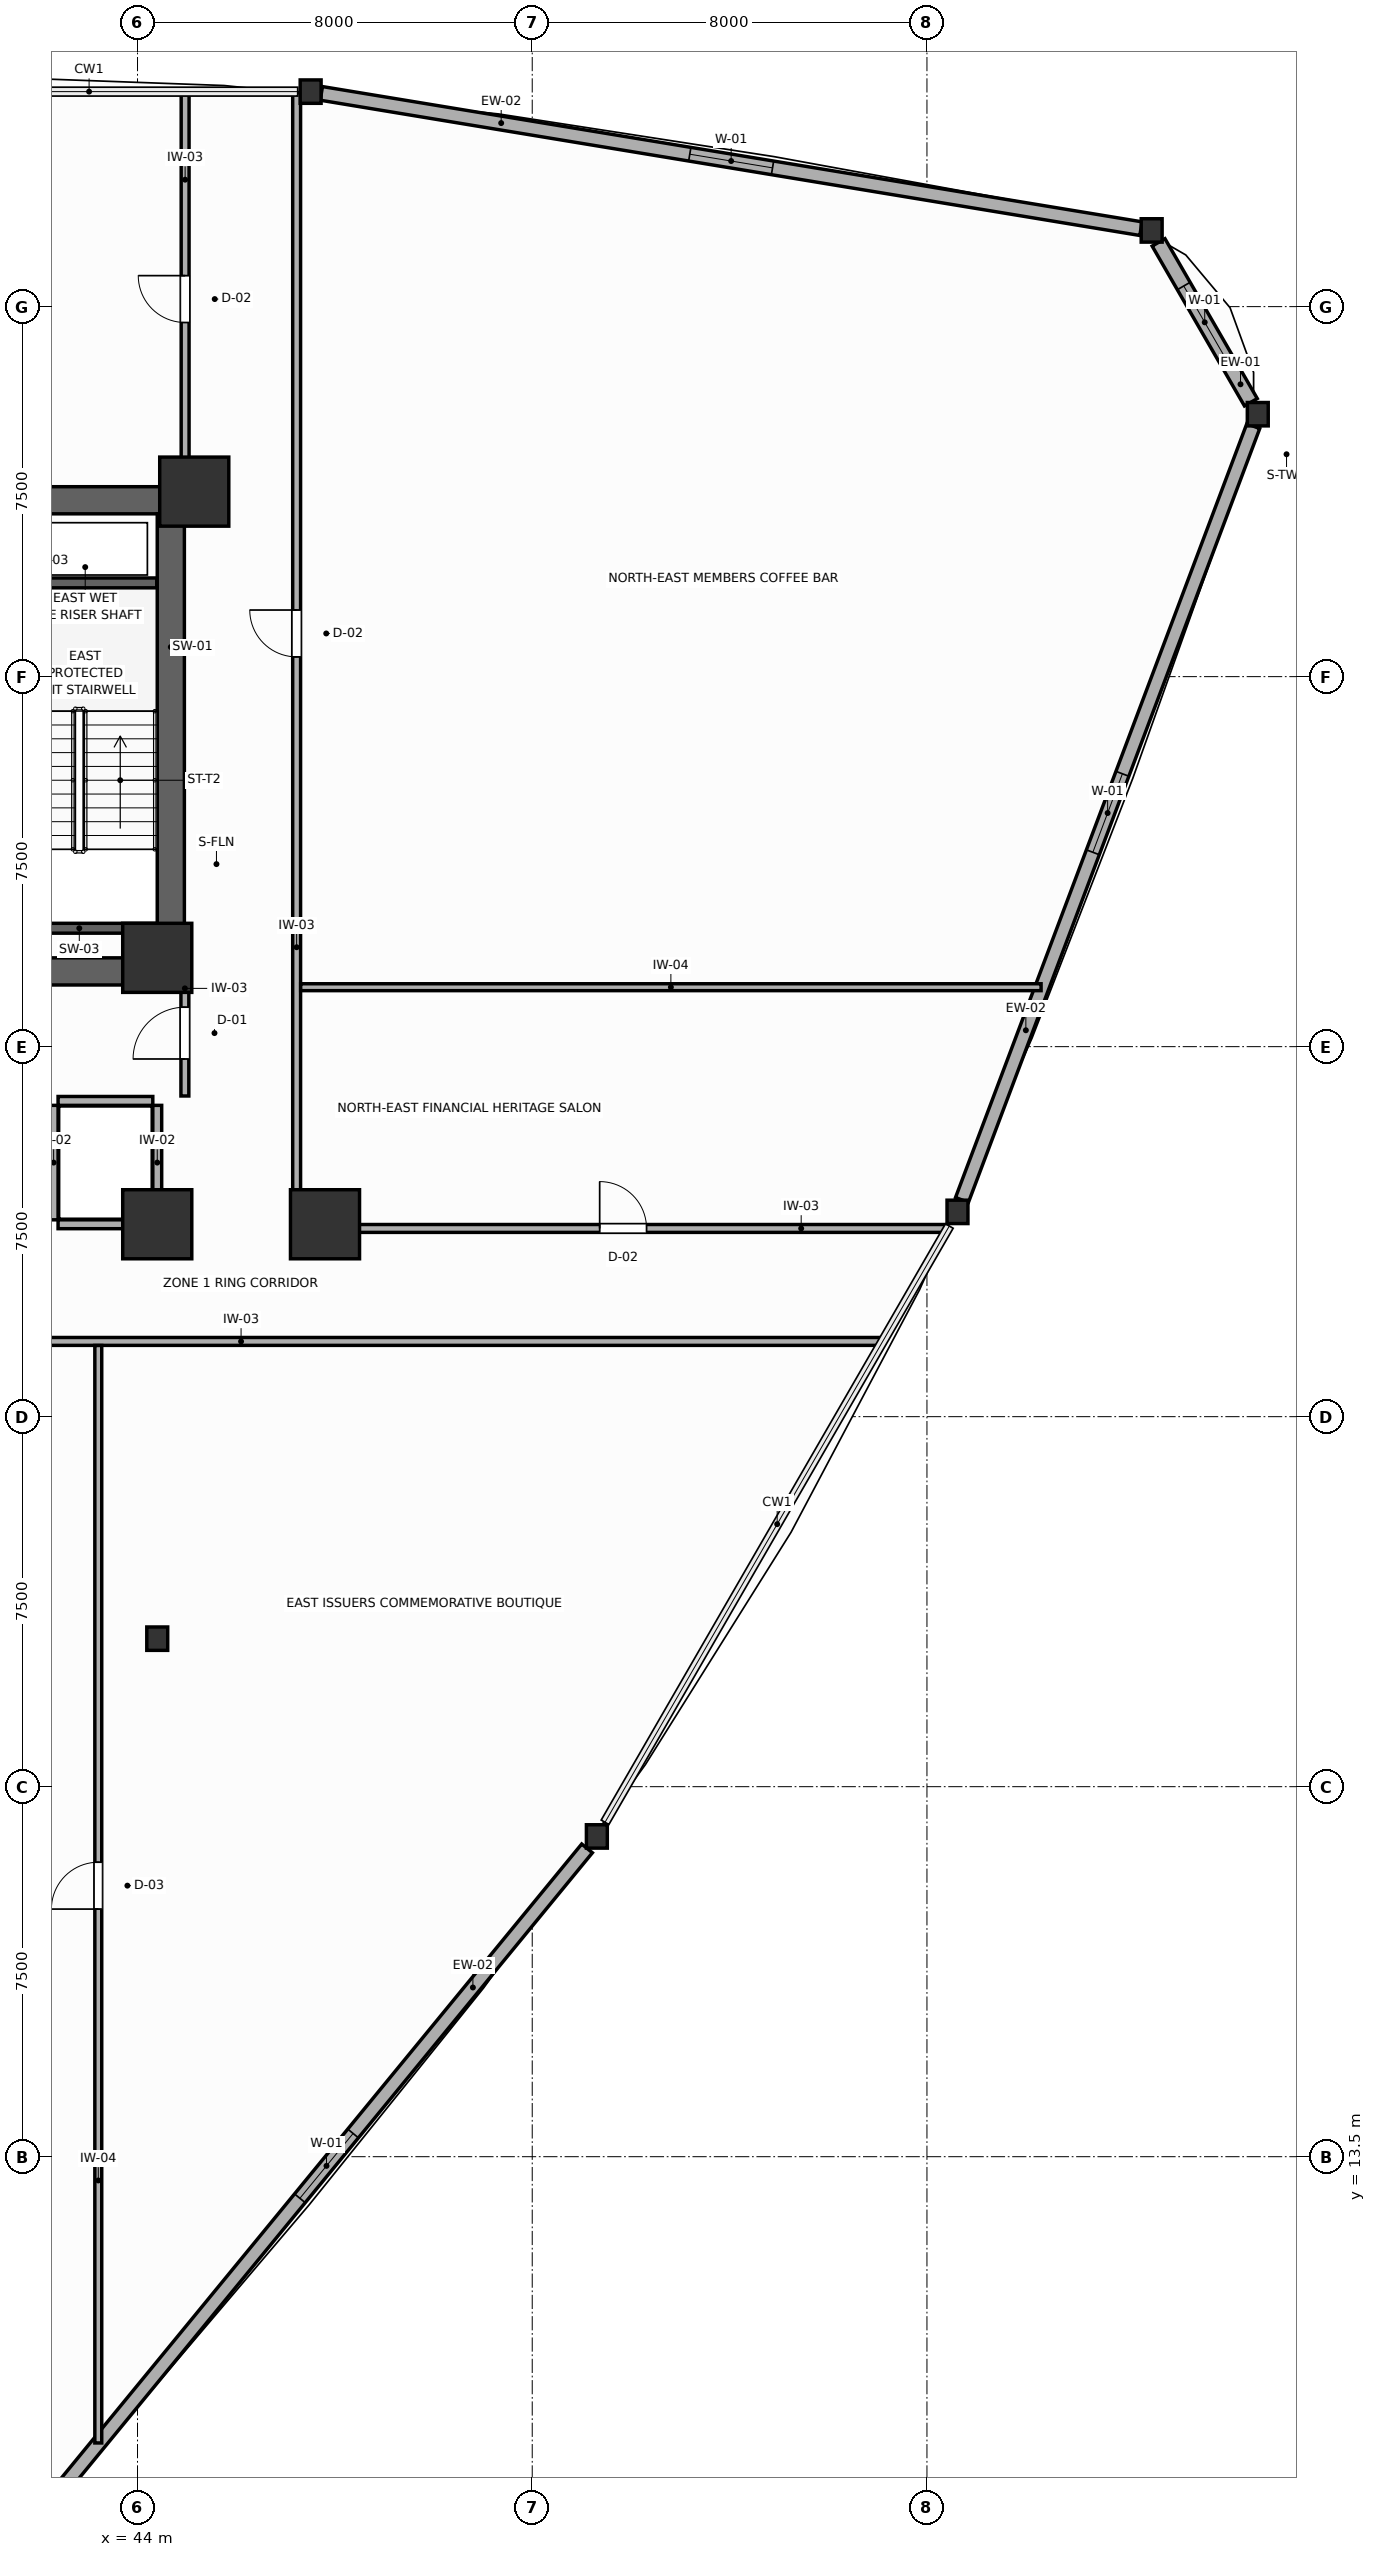
"""IFC4 building model, lengths in metres.
Left out: names, types, materials, properties, quantities, classifications, styles, units other than length and angle.
Written with IfcOpenShell. Run it as: python <this file> out.ifc"""

import sys

from ifc_helpers import new_model, si_unit, direction, frame, frame_2d, origin, origin_2d, place, context, subcontext, project, spatial, rectangle, i_section, extrude, source, transform, mapped, element, fill, save


model = new_model("IFC4")
c1 = context("Model", 3, precision=1e-05, world=origin(), true_north=direction((0.0, 1.0)))
c2 = subcontext(c1, "Body", "Model", "MODEL_VIEW")
j1 = project(units=[si_unit("LENGTHUNIT", "METRE"), si_unit("PLANEANGLEUNIT", "RADIAN")], contexts=[c1])
p1 = place(None, origin())
s1 = spatial("IfcSite", under=j1, at=p1, CompositionType="ELEMENT")
p2 = place(p1, origin())
s2 = spatial("IfcBuilding", under=s1, at=p2, CompositionType="ELEMENT")
p3 = place(p2, frame((0.0, 0.0, 91.2)))
s3 = spatial("IfcBuildingStorey", under=s2, at=p3, CompositionType="ELEMENT", Elevation=91.2)
p4 = place(p3, frame((27.05, 47.075, 0.0), z_axis=(0.0, 0.0, 1.0), x_axis=(1.0, 0.0, 0.0)))
e1 = element("IfcWall", 1, at=p4, inside=s3, PredefinedType="SHEAR", context=c2, shape_type="SweptSolid", body=[
    extrude(rectangle(XDim=17.9, YDim=0.55, at=frame_2d((8.95, 0.0))), origin(), (0.0, 0.0, 1.0), 3.9),
])
p5 = place(p3, frame((27.05, 37.525, 0.0), z_axis=(0.0, 0.0, 1.0), x_axis=(1.0, 0.0, 0.0)))
e2 = element("IfcWall", 2, at=p5, inside=s3, PredefinedType="SHEAR", context=c2, shape_type="SweptSolid", body=[
    extrude(rectangle(XDim=17.9, YDim=0.55, at=frame_2d((8.95, 0.0))), origin(), (0.0, 0.0, 1.0), 3.9),
])
p6 = place(p5, frame((4.975, 0.0, 0.0)))
e3 = element("IfcOpeningElement", 3, at=p6, cuts=e2, PredefinedType="OPENING", context=c2, shape_type="SweptSolid", body=[
    extrude(rectangle(XDim=1.05, YDim=2.1, at=frame_2d((0.525, 1.05))), frame((0.0, 0.285, 0.0), z_axis=(0.0, -1.0, 0.0), x_axis=(1.0, 0.0, 0.0)), (0.0, 0.0, 1.0), 0.57),
])
p7 = place(p5, frame((11.875, 0.0, 0.0)))
e4 = element("IfcOpeningElement", 4, at=p7, cuts=e2, PredefinedType="OPENING", context=c2, shape_type="SweptSolid", body=[
    extrude(rectangle(XDim=1.05, YDim=2.1, at=frame_2d((0.525, 1.05))), frame((0.0, 0.285, 0.0), z_axis=(0.0, -1.0, 0.0), x_axis=(1.0, 0.0, 0.0)), (0.0, 0.0, 1.0), 0.57),
])
p8 = place(p3, frame((44.675, 37.8, 0.0), z_axis=(0.0, 0.0, 1.0), x_axis=(0.0, 1.0, 0.0)))
e5 = element("IfcWall", 5, at=p8, inside=s3, PredefinedType="SHEAR", context=c2, shape_type="SweptSolid", body=[
    extrude(rectangle(XDim=9.0, YDim=0.55, at=frame_2d((4.5, 0.0))), origin(), (0.0, 0.0, 1.0), 3.9),
])
m1 = source(origin(), c2, "Body", "SweptSolid", [
    extrude(rectangle(XDim=1.4, YDim=1.4, at=origin_2d()), origin(), (0.0, 0.0, 1.0), 3.9),
])
for number, where, z_axis, x_axis in (
    (6, (45.15, 47.25, 0.0), (0.0, 0.0, 1.0), (1.0, 0.0, 0.0)),
    (7, (44.4, 37.8, 0.0), (0.0, 0.0, 1.0), (1.0, 0.0, 0.0)),
    (8, (44.4, 32.4, 0.0), (0.0, 0.0, 1.0), (1.0, 0.0, 0.0)),
    (9, (47.8, 32.4, 0.0), (0.0, 0.0, 1.0), (1.0, 0.0, 0.0)),
):
    element("IfcColumn", number, at=place(p3, frame(where, z_axis=z_axis, x_axis=x_axis)), inside=s3, PredefinedType="COLUMN", context=c2, shape_type="MappedRepresentation", body=[
        mapped(m1, transform((0.0, 0.0, 0.0), scale=1.0)),
    ])
m2 = source(origin(), c2, "Body", "SweptSolid", [
    extrude(i_section(OverallWidth=0.424, OverallDepth=0.474, WebThickness=0.045, FlangeThickness=0.072, FilletRadius=0.015, at=origin_2d()), origin(), (0.0, 0.0, 1.0), 3.9),
])
for number, where, z_axis, x_axis in (
    (10, (44.4, 24.0, 0.0), (0.0, 0.0, 1.0), (1.0, 0.0, 0.0)),
    (11, (66.705, 48.82, 0.0), (0.0, 0.0, 1.0), (1.0, 0.0, 0.0)),
    (12, (64.554, 52.544, 0.0), (0.0, 0.0, 1.0), (1.0, 0.0, 0.0)),
    (13, (47.509, 55.358, 0.0), (0.0, 0.0, 1.0), (1.0, 0.0, 0.0)),
    (14, (53.31, 19.991, 0.0), (0.0, 0.0, 1.0), (1.0, 0.0, 0.0)),
    (15, (60.619, 32.651, 0.0), (0.0, 0.0, 1.0), (1.0, 0.0, 0.0)),
):
    element("IfcColumn", number, at=place(p3, frame(where, z_axis=z_axis, x_axis=x_axis)), inside=s3, PredefinedType="COLUMN", context=c2, shape_type="MappedRepresentation", body=[
        mapped(m2, transform((0.0, 0.0, 0.0), scale=1.0)),
    ])
p9 = place(p3, frame((66.565, 49.062, 0.0), z_axis=(0.0, 0.0, 1.0), x_axis=(-0.500012356405, 0.866018269693, 0.0)))
e16 = element("IfcWall", 16, at=p9, inside=s3, PredefinedType="SOLIDWALL", context=c2, shape_type="SweptSolid", body=[
    extrude(rectangle(XDim=3.742, YDim=0.3, at=frame_2d((1.871, 0.0))), origin(), (0.0, 0.0, 1.0), 3.23),
])
p10 = place(p9, frame((1.021, 0.0, 0.75)))
e17 = element("IfcOpeningElement", 17, at=p10, cuts=e16, PredefinedType="OPENING", context=c2, shape_type="SweptSolid", body=[
    extrude(rectangle(XDim=1.7, YDim=1.75, at=frame_2d((0.85, 0.875))), frame((0.0, 0.16, 0.0), z_axis=(0.0, -1.0, 0.0), x_axis=(1.0, 0.0, 0.0)), (0.0, 0.0, 1.0), 0.32),
])
p11 = place(p3, frame((64.337, 52.58, 0.0), z_axis=(0.0, 0.0, 1.0), x_axis=(-0.986649040197, 0.162860896097, 0.0)))
e18 = element("IfcWall", 18, at=p11, inside=s3, PredefinedType="SOLIDWALL", context=c2, shape_type="SweptSolid", body=[
    extrude(rectangle(XDim=16.836, YDim=0.28, at=frame_2d((8.418, 0.0))), origin(), (0.0, 0.0, 1.0), 3.23),
])
p12 = place(p11, frame((7.568, 0.0, 0.75)))
e19 = element("IfcOpeningElement", 19, at=p12, cuts=e18, PredefinedType="OPENING", context=c2, shape_type="SweptSolid", body=[
    extrude(rectangle(XDim=1.7, YDim=1.75, at=frame_2d((0.85, 0.875))), frame((0.0, 0.15, 0.0), z_axis=(0.0, -1.0, 0.0), x_axis=(1.0, 0.0, 0.0)), (0.0, 0.0, 1.0), 0.3),
])
p13 = place(p3, frame((42.549, 6.878, 0.0), z_axis=(0.0, 0.0, 1.0), x_axis=(0.634372560511, 0.77302746036, 0.0)))
e20 = element("IfcWall", 20, at=p13, inside=s3, PredefinedType="SOLIDWALL", context=c2, shape_type="SweptSolid", body=[
    extrude(rectangle(XDim=16.65, YDim=0.28, at=frame_2d((8.325, 0.0))), origin(), (0.0, 0.0, 1.0), 3.23),
])
p14 = place(p13, frame((7.475, 0.0, 0.75)))
e21 = element("IfcOpeningElement", 21, at=p14, cuts=e20, PredefinedType="OPENING", context=c2, shape_type="SweptSolid", body=[
    extrude(rectangle(XDim=1.7, YDim=1.75, at=frame_2d((0.85, 0.875))), frame((0.0, 0.15, 0.0), z_axis=(0.0, -1.0, 0.0), x_axis=(1.0, 0.0, 0.0)), (0.0, 0.0, 1.0), 0.3),
])
p15 = place(p3, frame((60.71, 32.893, 0.0), z_axis=(0.0, 0.0, 1.0), x_axis=(0.352291780657, 0.935890218605, 0.0)))
e22 = element("IfcWall", 22, at=p15, inside=s3, PredefinedType="SOLIDWALL", context=c2, shape_type="SweptSolid", body=[
    extrude(rectangle(XDim=16.759, YDim=0.28, at=frame_2d((8.379, 0.0))), origin(), (0.0, 0.0, 1.0), 3.23),
])
p16 = place(p15, frame((7.53, 0.0, 0.75)))
e23 = element("IfcOpeningElement", 23, at=p16, cuts=e22, PredefinedType="OPENING", context=c2, shape_type="SweptSolid", body=[
    extrude(rectangle(XDim=1.7, YDim=1.75, at=frame_2d((0.85, 0.875))), frame((0.0, 0.15, 0.0), z_axis=(0.0, -1.0, 0.0), x_axis=(1.0, 0.0, 0.0)), (0.0, 0.0, 1.0), 0.3),
])
for number, where, z_axis, x_axis in (
    (24, (41.25, 45.4, 0.0), (0.0, 0.0, 1.0), (1.0, 0.0, 0.0)),
    (25, (41.25, 38.4, 0.0), (0.0, 0.0, 1.0), (1.0, 0.0, 0.0)),
):
    element("IfcWall", number, at=place(p3, frame(where, z_axis=z_axis, x_axis=x_axis)), inside=s3, PredefinedType="SHEAR", context=c2, shape_type="SweptSolid", body=[
        extrude(rectangle(XDim=3.14, YDim=0.2, at=frame_2d((1.57, 0.0))), origin(), (0.0, 0.0, 1.0), 3.9),
    ])
p17 = place(p3, frame((42.39, 34.9, 0.0), z_axis=(0.0, 0.0, 1.0), x_axis=(1.0, 0.0, 0.0)))
e26 = element("IfcWall", 26, at=p17, inside=s3, PredefinedType="PARTITIONING", context=c2, shape_type="SweptSolid", body=[
    extrude(rectangle(XDim=1.92, YDim=0.18, at=frame_2d((0.96, 0.0))), origin(), (0.0, 0.0, 1.0), 3.68),
])
p18 = place(p3, frame((42.39, 32.4, 0.0), z_axis=(0.0, 0.0, 1.0), x_axis=(1.0, 0.0, 0.0)))
e27 = element("IfcWall", 27, at=p18, inside=s3, PredefinedType="PARTITIONING", context=c2, shape_type="SweptSolid", body=[
    extrude(rectangle(XDim=1.92, YDim=0.18, at=frame_2d((0.96, 0.0))), origin(), (0.0, 0.0, 1.0), 3.18),
])
for number, where, z_axis, x_axis in (
    (28, (42.3, 32.49, 0.0), (0.0, 0.0, 1.0), (0.0, 1.0, 0.0)),
    (29, (44.4, 32.49, 0.0), (0.0, 0.0, 1.0), (0.0, 1.0, 0.0)),
):
    element("IfcWall", number, at=place(p3, frame(where, z_axis=z_axis, x_axis=x_axis)), inside=s3, PredefinedType="PARTITIONING", context=c2, shape_type="SweptSolid", body=[
        extrude(rectangle(XDim=2.32, YDim=0.18, at=frame_2d((1.16, 0.0))), origin(), (0.0, 0.0, 1.0), 3.68),
    ])
p19 = place(p3, frame((44.96, 35.0, 0.0), z_axis=(0.0, 0.0, 1.0), x_axis=(0.0, 1.0, 0.0)))
e30 = element("IfcWall", 30, at=p19, inside=s3, PredefinedType="PARTITIONING", context=c2, shape_type="SweptSolid", body=[
    extrude(rectangle(XDim=2.65, YDim=0.16, at=frame_2d((1.325, 0.0))), origin(), (0.0, 0.0, 1.0), 3.68),
])
p20 = place(p19, frame((0.75, 0.0, 0.0)))
e31 = element("IfcOpeningElement", 31, at=p20, cuts=e30, PredefinedType="OPENING", context=c2, shape_type="SweptSolid", body=[
    extrude(rectangle(XDim=1.05, YDim=2.1, at=frame_2d((0.525, 1.05))), frame((0.0, 0.09, 0.0), z_axis=(0.0, -1.0, 0.0), x_axis=(1.0, 0.0, 0.0)), (0.0, 0.0, 1.0), 0.18),
])
p21 = place(p3, frame((21.317, 30.025, 0.0), z_axis=(0.0, 0.0, 1.0), x_axis=(1.0, 0.0, 0.0)))
e32 = element("IfcWall", 32, at=p21, inside=s3, PredefinedType="PARTITIONING", context=c2, shape_type="SweptSolid", body=[
    extrude(rectangle(XDim=37.766, YDim=0.16, at=frame_2d((18.883, 0.0))), origin(), (0.0, 0.0, 1.0), 3.68),
])
p22 = place(p21, frame((10.668, 0.0, 0.0)))
e33 = element("IfcOpeningElement", 33, at=p22, cuts=e32, PredefinedType="OPENING", context=c2, shape_type="SweptSolid", body=[
    extrude(rectangle(XDim=0.95, YDim=2.05, at=frame_2d((0.475, 1.025))), frame((0.0, 0.09, 0.0), z_axis=(0.0, -1.0, 0.0), x_axis=(1.0, 0.0, 0.0)), (0.0, 0.0, 1.0), 0.18),
])
p23 = place(p21, frame((0.38, 0.0, 0.0)))
e34 = element("IfcOpeningElement", 34, at=p23, cuts=e32, PredefinedType="OPENING", context=c2, shape_type="SweptSolid", body=[
    extrude(rectangle(XDim=0.95, YDim=2.05, at=frame_2d((0.475, 1.025))), frame((0.0, 0.09, 0.0), z_axis=(0.0, -1.0, 0.0), x_axis=(1.0, 0.0, 0.0)), (0.0, 0.0, 1.0), 0.18),
])
p24 = place(p3, frame((47.225, 32.31, 0.0), z_axis=(0.0, 0.0, 1.0), x_axis=(0.0, 1.0, 0.0)))
e35 = element("IfcWall", 35, at=p24, inside=s3, PredefinedType="PARTITIONING", context=c2, shape_type="SweptSolid", body=[
    extrude(rectangle(XDim=23.028, YDim=0.16, at=frame_2d((11.514, 0.0))), origin(), (0.0, 0.0, 1.0), 3.18),
])
p25 = place(p24, frame((11.59, 0.0, 0.0)))
e36 = element("IfcOpeningElement", 36, at=p25, cuts=e35, PredefinedType="OPENING", context=c2, shape_type="SweptSolid", body=[
    extrude(rectangle(XDim=0.95, YDim=2.05, at=frame_2d((0.475, 1.025))), frame((0.0, 0.09, 0.0), z_axis=(0.0, -1.0, 0.0), x_axis=(1.0, 0.0, 0.0)), (0.0, 0.0, 1.0), 0.18),
])
p26 = place(p3, frame((47.307, 32.315, 0.0), z_axis=(0.0, 0.0, 1.0), x_axis=(1.0, 0.0, 0.0)))
e37 = element("IfcWall", 37, at=p26, inside=s3, PredefinedType="PARTITIONING", context=c2, shape_type="SweptSolid", body=[
    extrude(rectangle(XDim=13.098, YDim=0.16, at=frame_2d((6.549, 0.0))), origin(), (0.0, 0.0, 1.0), 3.18),
])
p27 = place(p26, frame((6.06, 0.0, 0.0)))
e38 = element("IfcOpeningElement", 38, at=p27, cuts=e37, PredefinedType="OPENING", context=c2, shape_type="SweptSolid", body=[
    extrude(rectangle(XDim=0.95, YDim=2.05, at=frame_2d((0.475, 1.025))), frame((0.0, 0.09, 0.0), z_axis=(0.0, -1.0, 0.0), x_axis=(1.0, 0.0, 0.0)), (0.0, 0.0, 1.0), 0.18),
])
p28 = place(p3, frame((44.965, 47.18, 0.0), z_axis=(0.0, 0.0, 1.0), x_axis=(0.0, 1.0, 0.0)))
e39 = element("IfcWall", 39, at=p28, inside=s3, PredefinedType="PARTITIONING", context=c2, shape_type="SweptSolid", body=[
    extrude(rectangle(XDim=8.158, YDim=0.16, at=frame_2d((4.079, 0.0))), origin(), (0.0, 0.0, 1.0), 3.68),
])
p29 = place(p28, frame((3.498, 0.0, 0.0)))
e40 = element("IfcOpeningElement", 40, at=p29, cuts=e39, PredefinedType="OPENING", context=c2, shape_type="SweptSolid", body=[
    extrude(rectangle(XDim=0.95, YDim=2.05, at=frame_2d((0.475, 1.025))), frame((0.0, 0.09, 0.0), z_axis=(0.0, -1.0, 0.0), x_axis=(1.0, 0.0, 0.0)), (0.0, 0.0, 1.0), 0.18),
])
p30 = place(p3, frame((43.205, 7.698, 0.0), z_axis=(0.0, 0.0, 1.0), x_axis=(0.0, 1.0, 0.0)))
e41 = element("IfcWall", 41, at=p30, inside=s3, PredefinedType="PARTITIONING", context=c2, shape_type="SweptSolid", body=[
    extrude(rectangle(XDim=22.246, YDim=0.14, at=frame_2d((11.123, 0.0))), origin(), (0.0, 0.0, 1.0), 3.18),
])
p31 = place(p30, frame((10.821, 0.0, 0.0)))
e42 = element("IfcOpeningElement", 42, at=p31, cuts=e41, PredefinedType="OPENING", context=c2, shape_type="SweptSolid", body=[
    extrude(rectangle(XDim=0.95, YDim=2.05, at=frame_2d((0.475, 1.025))), frame((0.0, 0.08, 0.0), z_axis=(0.0, -1.0, 0.0), x_axis=(1.0, 0.0, 0.0)), (0.0, 0.0, 1.0), 0.16),
])
p32 = place(p3, frame((47.307, 37.205, 0.0), z_axis=(0.0, 0.0, 1.0), x_axis=(1.0, 0.0, 0.0)))
e43 = element("IfcWall", 43, at=p32, inside=s3, PredefinedType="PARTITIONING", context=c2, shape_type="SweptSolid", body=[
    extrude(rectangle(XDim=15.006, YDim=0.14, at=frame_2d((7.503, 0.0))), origin(), (0.0, 0.0, 1.0), 3.68),
])
p33 = place(p10, origin())
e44 = element("IfcWindow", 44, at=p33, inside=s3, PartitioningType="SINGLE_PANEL", PredefinedType="WINDOW", context=c2, shape_type="SweptSolid", body=[
    extrude(rectangle(XDim=1.7, YDim=1.75, at=frame_2d((0.85, 0.875))), frame((0.0, 0.03, 0.0), z_axis=(0.0, -1.0, 0.0), x_axis=(1.0, 0.0, 0.0)), (0.0, 0.0, 1.0), 0.06),
])
fill(e17, e44)
p34 = place(p12, origin())
e45 = element("IfcWindow", 45, at=p34, inside=s3, PartitioningType="SINGLE_PANEL", PredefinedType="WINDOW", context=c2, shape_type="SweptSolid", body=[
    extrude(rectangle(XDim=1.7, YDim=1.75, at=frame_2d((0.85, 0.875))), frame((0.0, 0.03, 0.0), z_axis=(0.0, -1.0, 0.0), x_axis=(1.0, 0.0, 0.0)), (0.0, 0.0, 1.0), 0.06),
])
fill(e19, e45)
p35 = place(p14, origin())
e46 = element("IfcWindow", 46, at=p35, inside=s3, PartitioningType="SINGLE_PANEL", PredefinedType="WINDOW", context=c2, shape_type="SweptSolid", body=[
    extrude(rectangle(XDim=1.7, YDim=1.75, at=frame_2d((0.85, 0.875))), frame((0.0, 0.03, 0.0), z_axis=(0.0, -1.0, 0.0), x_axis=(1.0, 0.0, 0.0)), (0.0, 0.0, 1.0), 0.06),
])
fill(e21, e46)
p36 = place(p16, origin())
e47 = element("IfcWindow", 47, at=p36, inside=s3, PartitioningType="SINGLE_PANEL", PredefinedType="WINDOW", context=c2, shape_type="SweptSolid", body=[
    extrude(rectangle(XDim=1.7, YDim=1.75, at=frame_2d((0.85, 0.875))), frame((0.0, 0.03, 0.0), z_axis=(0.0, -1.0, 0.0), x_axis=(1.0, 0.0, 0.0)), (0.0, 0.0, 1.0), 0.06),
])
fill(e23, e47)
p37 = place(p20, origin())
e48 = element("IfcDoor", 48, at=p37, inside=s3, OperationType="SINGLE_SWING_LEFT", PredefinedType="DOOR", context=c2, shape_type="SweptSolid", body=[
    extrude(rectangle(XDim=1.05, YDim=2.1, at=frame_2d((0.525, 1.05))), frame((0.0, 0.025, 0.0), z_axis=(0.0, -1.0, 0.0), x_axis=(1.0, 0.0, 0.0)), (0.0, 0.0, 1.0), 0.05),
])
fill(e31, e48)
p38 = place(p25, origin())
e49 = element("IfcDoor", 49, at=p38, inside=s3, OperationType="SINGLE_SWING_RIGHT", PredefinedType="DOOR", context=c2, shape_type="SweptSolid", body=[
    extrude(rectangle(XDim=0.95, YDim=2.05, at=frame_2d((0.475, 1.025))), frame((0.0, 0.025, 0.0), z_axis=(0.0, -1.0, 0.0), x_axis=(1.0, 0.0, 0.0)), (0.0, 0.0, 1.0), 0.05),
])
fill(e36, e49)
p39 = place(p27, origin())
e50 = element("IfcDoor", 50, at=p39, inside=s3, OperationType="SINGLE_SWING_LEFT", PredefinedType="DOOR", context=c2, shape_type="SweptSolid", body=[
    extrude(rectangle(XDim=0.95, YDim=2.05, at=frame_2d((0.475, 1.025))), frame((0.0, 0.025, 0.0), z_axis=(0.0, -1.0, 0.0), x_axis=(1.0, 0.0, 0.0)), (0.0, 0.0, 1.0), 0.05),
])
fill(e38, e50)
p40 = place(p29, origin())
e51 = element("IfcDoor", 51, at=p40, inside=s3, OperationType="SINGLE_SWING_RIGHT", PredefinedType="DOOR", context=c2, shape_type="SweptSolid", body=[
    extrude(rectangle(XDim=0.95, YDim=2.05, at=frame_2d((0.475, 1.025))), frame((0.0, 0.025, 0.0), z_axis=(0.0, -1.0, 0.0), x_axis=(1.0, 0.0, 0.0)), (0.0, 0.0, 1.0), 0.05),
])
fill(e40, e51)
p41 = place(p31, origin())
e52 = element("IfcDoor", 52, at=p41, inside=s3, OperationType="SINGLE_SWING_LEFT", PredefinedType="DOOR", context=c2, shape_type="SweptSolid", body=[
    extrude(rectangle(XDim=0.95, YDim=2.05, at=frame_2d((0.475, 1.025))), frame((0.0, 0.025, 0.0), z_axis=(0.0, -1.0, 0.0), x_axis=(1.0, 0.0, 0.0)), (0.0, 0.0, 1.0), 0.05),
])
fill(e42, e52)
save(model, sys.argv[1])
